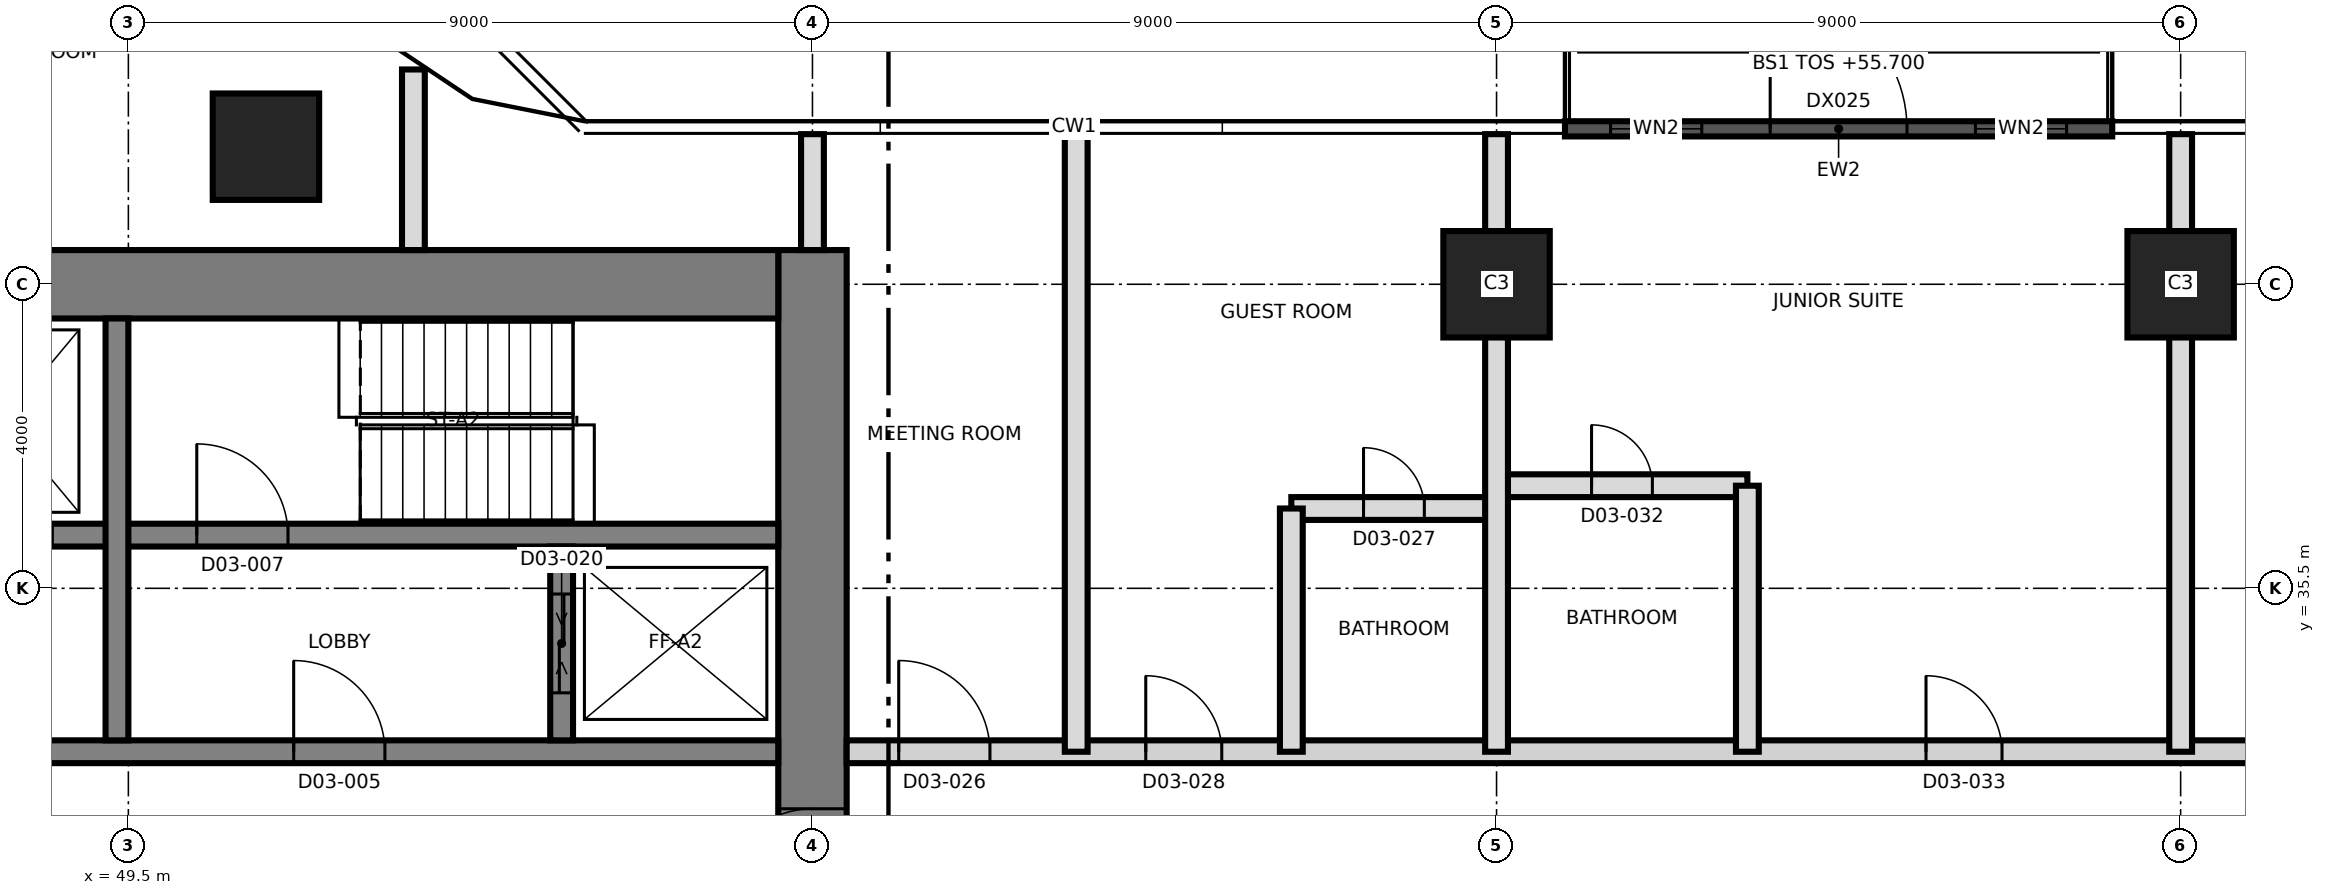
"""IFC4 building model, lengths in metres.
Left out: names, types, materials, properties, quantities, classifications, styles, units other than length and angle.
Written with IfcOpenShell. Run it as: python <this file> out.ifc"""

import sys

from ifc_helpers import new_model, si_unit, direction, frame, frame_2d, origin, origin_2d, place, context, subcontext, project, spatial, rectangle, extrude, element, fill, save


model = new_model("IFC4")
c1 = context("Model", 3, precision=1e-05, world=origin(), true_north=direction((0.0, 1.0)))
c2 = subcontext(c1, "Body", "Model", "MODEL_VIEW")
j1 = project(units=[si_unit("LENGTHUNIT", "METRE"), si_unit("PLANEANGLEUNIT", "RADIAN")], contexts=[c1])
p1 = place(None, origin())
s1 = spatial("IfcSite", under=j1, at=p1, CompositionType="ELEMENT")
p2 = place(p1, origin())
s2 = spatial("IfcBuilding", under=s1, at=p2, CompositionType="ELEMENT")
p3 = place(p2, frame((0.0, 0.0, 55.7)))
s3 = spatial("IfcBuildingStorey", under=s2, at=p3, CompositionType="ELEMENT", Elevation=55.7)
p4 = place(p3, frame((58.5, 21.05, 0.0), z_axis=(0.0, 0.0, 1.0), x_axis=(0.0, 1.0, 0.0)))
e1 = element("IfcWall", 1, at=p4, inside=s3, PredefinedType="SHEAR", context=c2, shape_type="SweptSolid", body=[
    extrude(rectangle(XDim=18.9, YDim=0.9, at=frame_2d((9.45, 0.0))), origin(), (0.0, 0.0, 1.0), 3.7),
])
p5 = place(p4, frame((10.35, 0.0, 0.0)))
e2 = element("IfcOpeningElement", 2, at=p5, cuts=e1, PredefinedType="OPENING", context=c2, shape_type="SweptSolid", body=[
    extrude(rectangle(XDim=1.2, YDim=2.1, at=frame_2d((0.6, 1.05))), frame((0.0, 0.46, 0.0), z_axis=(0.0, -1.0, 0.0), x_axis=(1.0, 0.0, 0.0)), (0.0, 0.0, 1.0), 0.92),
])
p6 = place(p3, frame((31.05, 39.5, 0.0), z_axis=(0.0, 0.0, 1.0), x_axis=(1.0, 0.0, 0.0)))
e3 = element("IfcWall", 3, at=p6, inside=s3, PredefinedType="SHEAR", context=c2, shape_type="SweptSolid", body=[
    extrude(rectangle(XDim=27.0, YDim=0.9, at=frame_2d((13.5, 0.0))), origin(), (0.0, 0.0, 1.0), 3.7),
])
p7 = place(p6, frame((10.65, 0.0, 0.0)))
e4 = element("IfcOpeningElement", 4, at=p7, cuts=e3, PredefinedType="OPENING", context=c2, shape_type="SweptSolid", body=[
    extrude(rectangle(XDim=1.2, YDim=2.1, at=frame_2d((0.6, 1.05))), frame((0.0, 0.46, 0.0), z_axis=(0.0, -1.0, 0.0), x_axis=(1.0, 0.0, 0.0)), (0.0, 0.0, 1.0), 0.92),
])
p8 = place(p3, frame((31.95, 33.35, 0.0), z_axis=(0.0, 0.0, 1.0), x_axis=(1.0, 0.0, 0.0)))
e5 = element("IfcWall", 5, at=p8, inside=s3, PredefinedType="SHEAR", context=c2, shape_type="SweptSolid", body=[
    extrude(rectangle(XDim=26.1, YDim=0.3, at=frame_2d((13.05, 0.0))), origin(), (0.0, 0.0, 1.0), 3.7),
])
p9 = place(p8, frame((13.125, 0.0, 0.0)))
e6 = element("IfcOpeningElement", 6, at=p9, cuts=e5, PredefinedType="OPENING", context=c2, shape_type="SweptSolid", body=[
    extrude(rectangle(XDim=1.4, YDim=2.1, at=frame_2d((0.7, 1.05))), frame((0.0, 0.16, 0.0), z_axis=(0.0, -1.0, 0.0), x_axis=(1.0, 0.0, 0.0)), (0.0, 0.0, 1.0), 0.32),
])
p10 = place(p8, frame((5.175, 0.0, 0.0)))
e7 = element("IfcOpeningElement", 7, at=p10, cuts=e5, PredefinedType="OPENING", context=c2, shape_type="SweptSolid", body=[
    extrude(rectangle(XDim=1.2, YDim=2.1, at=frame_2d((0.6, 1.05))), frame((0.0, 0.16, 0.0), z_axis=(0.0, -1.0, 0.0), x_axis=(1.0, 0.0, 0.0)), (0.0, 0.0, 1.0), 0.32),
])
p11 = place(p8, frame((19.725, 0.0, 0.0)))
e8 = element("IfcOpeningElement", 8, at=p11, cuts=e5, PredefinedType="OPENING", context=c2, shape_type="SweptSolid", body=[
    extrude(rectangle(XDim=1.2, YDim=2.1, at=frame_2d((0.6, 1.05))), frame((0.0, 0.16, 0.0), z_axis=(0.0, -1.0, 0.0), x_axis=(1.0, 0.0, 0.0)), (0.0, 0.0, 1.0), 0.32),
])
p12 = place(p3, frame((43.5, 36.2, 0.0), z_axis=(0.0, 0.0, 1.0), x_axis=(1.0, 0.0, 0.0)))
e9 = element("IfcWall", 9, at=p12, inside=s3, PredefinedType="SHEAR", context=c2, shape_type="SweptSolid", body=[
    extrude(rectangle(XDim=14.55, YDim=0.3, at=frame_2d((7.275, 0.0))), origin(), (0.0, 0.0, 1.0), 3.7),
])
p13 = place(p12, frame((6.9, 0.0, 0.0)))
e10 = element("IfcOpeningElement", 10, at=p13, cuts=e9, PredefinedType="OPENING", context=c2, shape_type="SweptSolid", body=[
    extrude(rectangle(XDim=1.2, YDim=2.1, at=frame_2d((0.6, 1.05))), frame((0.0, 0.16, 0.0), z_axis=(0.0, -1.0, 0.0), x_axis=(1.0, 0.0, 0.0)), (0.0, 0.0, 1.0), 0.32),
])
p14 = place(p12, frame((0.7, 0.0, 0.0)))
e11 = element("IfcOpeningElement", 11, at=p14, cuts=e9, PredefinedType="OPENING", context=c2, shape_type="SweptSolid", body=[
    extrude(rectangle(XDim=1.3, YDim=2.4, at=frame_2d((0.65, 1.2))), frame((0.0, 0.16, 0.0), z_axis=(0.0, -1.0, 0.0), x_axis=(1.0, 0.0, 0.0)), (0.0, 0.0, 1.0), 0.32),
])
p15 = place(p12, frame((3.7, 0.0, 0.0)))
e12 = element("IfcOpeningElement", 12, at=p15, cuts=e9, PredefinedType="OPENING", context=c2, shape_type="SweptSolid", body=[
    extrude(rectangle(XDim=1.3, YDim=2.4, at=frame_2d((0.65, 1.2))), frame((0.0, 0.16, 0.0), z_axis=(0.0, -1.0, 0.0), x_axis=(1.0, 0.0, 0.0)), (0.0, 0.0, 1.0), 0.32),
])
p16 = place(p3, frame((49.35, 33.5, 0.0), z_axis=(0.0, 0.0, 1.0), x_axis=(0.0, 1.0, 0.0)))
e13 = element("IfcWall", 13, at=p16, inside=s3, PredefinedType="SHEAR", context=c2, shape_type="SweptSolid", body=[
    extrude(rectangle(XDim=5.55, YDim=0.3, at=frame_2d((2.775, 0.0))), origin(), (0.0, 0.0, 1.0), 3.7),
])
p17 = place(p3, frame((55.2, 33.5, 0.0), z_axis=(0.0, 0.0, 1.0), x_axis=(0.0, 1.0, 0.0)))
e14 = element("IfcWall", 14, at=p17, inside=s3, PredefinedType="SHEAR", context=c2, shape_type="SweptSolid", body=[
    extrude(rectangle(XDim=2.55, YDim=0.3, at=frame_2d((1.275, 0.0))), origin(), (0.0, 0.0, 1.0), 3.7),
])
p18 = place(p17, frame((0.625, 0.0, 0.0)))
e15 = element("IfcOpeningElement", 15, at=p18, cuts=e14, PredefinedType="OPENING", context=c2, shape_type="SweptSolid", body=[
    extrude(rectangle(XDim=1.3, YDim=2.4, at=frame_2d((0.65, 1.2))), frame((0.0, 0.16, 0.0), z_axis=(0.0, -1.0, 0.0), x_axis=(1.0, 0.0, 0.0)), (0.0, 0.0, 1.0), 0.32),
])
for number, where, z_axis, x_axis in (
    (16, (67.5, 39.5, 0.0), (0.0, 0.0, 1.0), (1.0, 0.0, 0.0)),
    (17, (76.5, 39.5, 0.0), (0.0, 0.0, 1.0), (1.0, 0.0, 0.0)),
    (18, (51.31, 41.31, 0.0), (0.0, 0.0, 1.0), (1.0, 0.0, 0.0)),
):
    element("IfcColumn", number, at=place(p3, frame(where, z_axis=z_axis, x_axis=x_axis)), inside=s3, PredefinedType="COLUMN", context=c2, shape_type="SweptSolid", body=[
        extrude(rectangle(XDim=1.4, YDim=1.4, at=origin_2d()), origin(), (0.0, 0.0, 1.0), 3.7),
    ])
p19 = place(p3, frame((68.4, 41.545, 0.0), z_axis=(0.0, 0.0, 1.0), x_axis=(1.0, 0.0, 0.0)))
e19 = element("IfcWall", 19, at=p19, inside=s3, PredefinedType="SOLIDWALL", context=c2, shape_type="SweptSolid", body=[
    extrude(rectangle(XDim=7.2, YDim=0.2, at=frame_2d((3.6, 0.0))), origin(), (0.0, 0.0, 1.0), 3.4),
])
p20 = place(p19, frame((2.7, 0.0, 0.0)))
e20 = element("IfcOpeningElement", 20, at=p20, cuts=e19, PredefinedType="OPENING", context=c2, shape_type="SweptSolid", body=[
    extrude(rectangle(XDim=1.8, YDim=2.4, at=frame_2d((0.9, 1.2))), frame((0.0, 0.11, 0.0), z_axis=(0.0, -1.0, 0.0), x_axis=(1.0, 0.0, 0.0)), (0.0, 0.0, 1.0), 0.22),
])
p21 = place(p19, frame((5.4, 0.0, 0.9)))
e21 = element("IfcOpeningElement", 21, at=p21, cuts=e19, PredefinedType="OPENING", context=c2, shape_type="SweptSolid", body=[
    extrude(rectangle(XDim=1.2, YDim=2.1, at=frame_2d((0.6, 1.05))), frame((0.0, 0.11, 0.0), z_axis=(0.0, -1.0, 0.0), x_axis=(1.0, 0.0, 0.0)), (0.0, 0.0, 1.0), 0.22),
])
p22 = place(p19, frame((0.6, 0.0, 0.9)))
e22 = element("IfcOpeningElement", 22, at=p22, cuts=e19, PredefinedType="OPENING", context=c2, shape_type="SweptSolid", body=[
    extrude(rectangle(XDim=1.2, YDim=2.1, at=frame_2d((0.6, 1.05))), frame((0.0, 0.11, 0.0), z_axis=(0.0, -1.0, 0.0), x_axis=(1.0, 0.0, 0.0)), (0.0, 0.0, 1.0), 0.22),
])
p23 = place(p3, frame((58.95, 33.35, 0.0), z_axis=(0.0, 0.0, 1.0), x_axis=(1.0, 0.0, 0.0)))
e23 = element("IfcWall", 23, at=p23, inside=s3, PredefinedType="PARTITIONING", context=c2, shape_type="SweptSolid", body=[
    extrude(rectangle(XDim=26.38, YDim=0.3, at=frame_2d((13.19, 0.0))), origin(), (0.0, 0.0, 1.0), 3.4),
])
p24 = place(p23, frame((0.685, 0.0, 0.0)))
e24 = element("IfcOpeningElement", 24, at=p24, cuts=e23, PredefinedType="OPENING", context=c2, shape_type="SweptSolid", body=[
    extrude(rectangle(XDim=1.2, YDim=2.1, at=frame_2d((0.6, 1.05))), frame((0.0, 0.16, 0.0), z_axis=(0.0, -1.0, 0.0), x_axis=(1.0, 0.0, 0.0)), (0.0, 0.0, 1.0), 0.32),
])
p25 = place(p23, frame((3.935, 0.0, 0.0)))
e25 = element("IfcOpeningElement", 25, at=p25, cuts=e23, PredefinedType="OPENING", context=c2, shape_type="SweptSolid", body=[
    extrude(rectangle(XDim=1.0, YDim=2.1, at=frame_2d((0.5, 1.05))), frame((0.0, 0.16, 0.0), z_axis=(0.0, -1.0, 0.0), x_axis=(1.0, 0.0, 0.0)), (0.0, 0.0, 1.0), 0.32),
])
p26 = place(p23, frame((14.2, 0.0, 0.0)))
e26 = element("IfcOpeningElement", 26, at=p26, cuts=e23, PredefinedType="OPENING", context=c2, shape_type="SweptSolid", body=[
    extrude(rectangle(XDim=1.0, YDim=2.4, at=frame_2d((0.5, 1.2))), frame((0.0, 0.16, 0.0), z_axis=(0.0, -1.0, 0.0), x_axis=(1.0, 0.0, 0.0)), (0.0, 0.0, 1.0), 0.32),
])
p27 = place(p23, frame((19.25, 0.0, 0.0)))
e27 = element("IfcOpeningElement", 27, at=p27, cuts=e23, PredefinedType="OPENING", context=c2, shape_type="SweptSolid", body=[
    extrude(rectangle(XDim=1.2, YDim=2.1, at=frame_2d((0.6, 1.05))), frame((0.0, 0.16, 0.0), z_axis=(0.0, -1.0, 0.0), x_axis=(1.0, 0.0, 0.0)), (0.0, 0.0, 1.0), 0.32),
])
p28 = place(p23, frame((22.5, 0.0, 0.0)))
e28 = element("IfcOpeningElement", 28, at=p28, cuts=e23, PredefinedType="OPENING", context=c2, shape_type="SweptSolid", body=[
    extrude(rectangle(XDim=1.0, YDim=2.1, at=frame_2d((0.5, 1.05))), frame((0.0, 0.16, 0.0), z_axis=(0.0, -1.0, 0.0), x_axis=(1.0, 0.0, 0.0)), (0.0, 0.0, 1.0), 0.32),
])
p29 = place(p3, frame((64.8, 36.55, 0.0), z_axis=(0.0, 0.0, 1.0), x_axis=(1.0, 0.0, 0.0)))
e29 = element("IfcWall", 29, at=p29, inside=s3, PredefinedType="PARTITIONING", context=c2, shape_type="SweptSolid", body=[
    extrude(rectangle(XDim=2.7, YDim=0.3, at=frame_2d((1.35, 0.0))), origin(), (0.0, 0.0, 1.0), 3.4),
])
p30 = place(p29, frame((0.95, 0.0, 0.0)))
e30 = element("IfcOpeningElement", 30, at=p30, cuts=e29, PredefinedType="OPENING", context=c2, shape_type="SweptSolid", body=[
    extrude(rectangle(XDim=0.8, YDim=2.1, at=frame_2d((0.4, 1.05))), frame((0.0, 0.16, 0.0), z_axis=(0.0, -1.0, 0.0), x_axis=(1.0, 0.0, 0.0)), (0.0, 0.0, 1.0), 0.32),
])
p31 = place(p3, frame((67.5, 36.85, 0.0), z_axis=(0.0, 0.0, 1.0), x_axis=(1.0, 0.0, 0.0)))
e31 = element("IfcWall", 31, at=p31, inside=s3, PredefinedType="PARTITIONING", context=c2, shape_type="SweptSolid", body=[
    extrude(rectangle(XDim=3.3, YDim=0.3, at=frame_2d((1.65, 0.0))), origin(), (0.0, 0.0, 1.0), 3.4),
])
p32 = place(p31, frame((1.25, 0.0, 0.0)))
e32 = element("IfcOpeningElement", 32, at=p32, cuts=e31, PredefinedType="OPENING", context=c2, shape_type="SweptSolid", body=[
    extrude(rectangle(XDim=0.8, YDim=2.1, at=frame_2d((0.4, 1.05))), frame((0.0, 0.16, 0.0), z_axis=(0.0, -1.0, 0.0), x_axis=(1.0, 0.0, 0.0)), (0.0, 0.0, 1.0), 0.32),
])
p33 = place(p3, frame((53.25, 39.95, 0.0), z_axis=(0.0, 0.0, 1.0), x_axis=(0.0, 1.0, 0.0)))
e33 = element("IfcWall", 33, at=p33, inside=s3, PredefinedType="PARTITIONING", context=c2, shape_type="SweptSolid", body=[
    extrude(rectangle(XDim=2.376, YDim=0.3, at=frame_2d((1.188, 0.0))), origin(), (0.0, 0.0, 1.0), 3.4),
])
p34 = place(p3, frame((58.5, 39.95, 0.0), z_axis=(0.0, 0.0, 1.0), x_axis=(0.0, 1.0, 0.0)))
e34 = element("IfcWall", 34, at=p34, inside=s3, PredefinedType="PARTITIONING", context=c2, shape_type="SweptSolid", body=[
    extrude(rectangle(XDim=1.525, YDim=0.3, at=frame_2d((0.763, 0.0))), origin(), (0.0, 0.0, 1.0), 3.4),
])
p35 = place(p3, frame((61.97, 33.35, 0.0), z_axis=(0.0, 0.0, 1.0), x_axis=(0.0, 1.0, 0.0)))
e35 = element("IfcWall", 35, at=p35, inside=s3, PredefinedType="PARTITIONING", context=c2, shape_type="SweptSolid", body=[
    extrude(rectangle(XDim=8.125, YDim=0.3, at=frame_2d((4.062, 0.0))), origin(), (0.0, 0.0, 1.0), 3.4),
])
p36 = place(p3, frame((64.8, 33.35, 0.0), z_axis=(0.0, 0.0, 1.0), x_axis=(0.0, 1.0, 0.0)))
e36 = element("IfcWall", 36, at=p36, inside=s3, PredefinedType="PARTITIONING", context=c2, shape_type="SweptSolid", body=[
    extrude(rectangle(XDim=3.2, YDim=0.3, at=frame_2d((1.6, 0.0))), origin(), (0.0, 0.0, 1.0), 3.4),
])
p37 = place(p3, frame((67.5, 33.35, 0.0), z_axis=(0.0, 0.0, 1.0), x_axis=(0.0, 1.0, 0.0)))
e37 = element("IfcWall", 37, at=p37, inside=s3, PredefinedType="PARTITIONING", context=c2, shape_type="SweptSolid", body=[
    extrude(rectangle(XDim=8.125, YDim=0.3, at=frame_2d((4.062, 0.0))), origin(), (0.0, 0.0, 1.0), 3.4),
])
p38 = place(p3, frame((70.8, 33.35, 0.0), z_axis=(0.0, 0.0, 1.0), x_axis=(0.0, 1.0, 0.0)))
e38 = element("IfcWall", 38, at=p38, inside=s3, PredefinedType="PARTITIONING", context=c2, shape_type="SweptSolid", body=[
    extrude(rectangle(XDim=3.5, YDim=0.3, at=frame_2d((1.75, 0.0))), origin(), (0.0, 0.0, 1.0), 3.4),
])
p39 = place(p3, frame((76.5, 33.35, 0.0), z_axis=(0.0, 0.0, 1.0), x_axis=(0.0, 1.0, 0.0)))
e39 = element("IfcWall", 39, at=p39, inside=s3, PredefinedType="PARTITIONING", context=c2, shape_type="SweptSolid", body=[
    extrude(rectangle(XDim=8.125, YDim=0.3, at=frame_2d((4.062, 0.0))), origin(), (0.0, 0.0, 1.0), 3.4),
])
p40 = place(p20, origin())
e40 = element("IfcDoor", 40, at=p40, inside=s3, OperationType="SINGLE_SWING_LEFT", PredefinedType="DOOR", context=c2, shape_type="SweptSolid", body=[
    extrude(rectangle(XDim=1.8, YDim=2.4, at=frame_2d((0.9, 1.2))), frame((0.0, 0.025, 0.0), z_axis=(0.0, -1.0, 0.0), x_axis=(1.0, 0.0, 0.0)), (0.0, 0.0, 1.0), 0.05),
])
fill(e20, e40)
p41 = place(p21, origin())
e41 = element("IfcWindow", 41, at=p41, inside=s3, PartitioningType="SINGLE_PANEL", PredefinedType="WINDOW", context=c2, shape_type="SweptSolid", body=[
    extrude(rectangle(XDim=1.2, YDim=2.1, at=frame_2d((0.6, 1.05))), frame((0.0, 0.03, 0.0), z_axis=(0.0, -1.0, 0.0), x_axis=(1.0, 0.0, 0.0)), (0.0, 0.0, 1.0), 0.06),
])
fill(e21, e41)
p42 = place(p22, origin())
e42 = element("IfcWindow", 42, at=p42, inside=s3, PartitioningType="SINGLE_PANEL", PredefinedType="WINDOW", context=c2, shape_type="SweptSolid", body=[
    extrude(rectangle(XDim=1.2, YDim=2.1, at=frame_2d((0.6, 1.05))), frame((0.0, 0.03, 0.0), z_axis=(0.0, -1.0, 0.0), x_axis=(1.0, 0.0, 0.0)), (0.0, 0.0, 1.0), 0.06),
])
fill(e22, e42)
p43 = place(p11, origin())
e43 = element("IfcDoor", 43, at=p43, inside=s3, OperationType="SINGLE_SWING_RIGHT", PredefinedType="DOOR", context=c2, shape_type="SweptSolid", body=[
    extrude(rectangle(XDim=1.2, YDim=2.1, at=frame_2d((0.6, 1.05))), frame((0.0, 0.025, 0.0), z_axis=(0.0, -1.0, 0.0), x_axis=(1.0, 0.0, 0.0)), (0.0, 0.0, 1.0), 0.05),
])
fill(e8, e43)
p44 = place(p13, origin())
e44 = element("IfcDoor", 44, at=p44, inside=s3, OperationType="SINGLE_SWING_LEFT", PredefinedType="DOOR", context=c2, shape_type="SweptSolid", body=[
    extrude(rectangle(XDim=1.2, YDim=2.1, at=frame_2d((0.6, 1.05))), frame((0.0, 0.025, 0.0), z_axis=(0.0, -1.0, 0.0), x_axis=(1.0, 0.0, 0.0)), (0.0, 0.0, 1.0), 0.05),
])
fill(e10, e44)
p45 = place(p5, origin())
e45 = element("IfcDoor", 45, at=p45, inside=s3, OperationType="SINGLE_SWING_LEFT", PredefinedType="DOOR", context=c2, shape_type="SweptSolid", body=[
    extrude(rectangle(XDim=1.2, YDim=2.1, at=frame_2d((0.6, 1.05))), frame((0.0, 0.025, 0.0), z_axis=(0.0, -1.0, 0.0), x_axis=(1.0, 0.0, 0.0)), (0.0, 0.0, 1.0), 0.05),
])
fill(e2, e45)
p46 = place(p18, origin())
e46 = element("IfcDoor", 46, at=p46, inside=s3, OperationType="SLIDING_TO_LEFT", PredefinedType="DOOR", context=c2, shape_type="SweptSolid", body=[
    extrude(rectangle(XDim=1.3, YDim=2.4, at=frame_2d((0.65, 1.2))), frame((0.0, 0.025, 0.0), z_axis=(0.0, -1.0, 0.0), x_axis=(1.0, 0.0, 0.0)), (0.0, 0.0, 1.0), 0.05),
])
fill(e15, e46)
p47 = place(p24, origin())
e47 = element("IfcDoor", 47, at=p47, inside=s3, OperationType="SINGLE_SWING_LEFT", PredefinedType="DOOR", context=c2, shape_type="SweptSolid", body=[
    extrude(rectangle(XDim=1.2, YDim=2.1, at=frame_2d((0.6, 1.05))), frame((0.0, 0.025, 0.0), z_axis=(0.0, -1.0, 0.0), x_axis=(1.0, 0.0, 0.0)), (0.0, 0.0, 1.0), 0.05),
])
fill(e24, e47)
p48 = place(p30, origin())
e48 = element("IfcDoor", 48, at=p48, inside=s3, OperationType="SINGLE_SWING_RIGHT", PredefinedType="DOOR", context=c2, shape_type="SweptSolid", body=[
    extrude(rectangle(XDim=0.8, YDim=2.1, at=frame_2d((0.4, 1.05))), frame((0.0, 0.025, 0.0), z_axis=(0.0, -1.0, 0.0), x_axis=(1.0, 0.0, 0.0)), (0.0, 0.0, 1.0), 0.05),
])
fill(e30, e48)
p49 = place(p25, origin())
e49 = element("IfcDoor", 49, at=p49, inside=s3, OperationType="SINGLE_SWING_LEFT", PredefinedType="DOOR", context=c2, shape_type="SweptSolid", body=[
    extrude(rectangle(XDim=1.0, YDim=2.1, at=frame_2d((0.5, 1.05))), frame((0.0, 0.025, 0.0), z_axis=(0.0, -1.0, 0.0), x_axis=(1.0, 0.0, 0.0)), (0.0, 0.0, 1.0), 0.05),
])
fill(e25, e49)
p50 = place(p32, origin())
e50 = element("IfcDoor", 50, at=p50, inside=s3, OperationType="SINGLE_SWING_LEFT", PredefinedType="DOOR", context=c2, shape_type="SweptSolid", body=[
    extrude(rectangle(XDim=0.8, YDim=2.1, at=frame_2d((0.4, 1.05))), frame((0.0, 0.025, 0.0), z_axis=(0.0, -1.0, 0.0), x_axis=(1.0, 0.0, 0.0)), (0.0, 0.0, 1.0), 0.05),
])
fill(e32, e50)
p51 = place(p26, origin())
e51 = element("IfcDoor", 51, at=p51, inside=s3, OperationType="SINGLE_SWING_LEFT", PredefinedType="DOOR", context=c2, shape_type="SweptSolid", body=[
    extrude(rectangle(XDim=1.0, YDim=2.4, at=frame_2d((0.5, 1.2))), frame((0.0, 0.025, 0.0), z_axis=(0.0, -1.0, 0.0), x_axis=(1.0, 0.0, 0.0)), (0.0, 0.0, 1.0), 0.05),
])
fill(e26, e51)
save(model, sys.argv[1])
